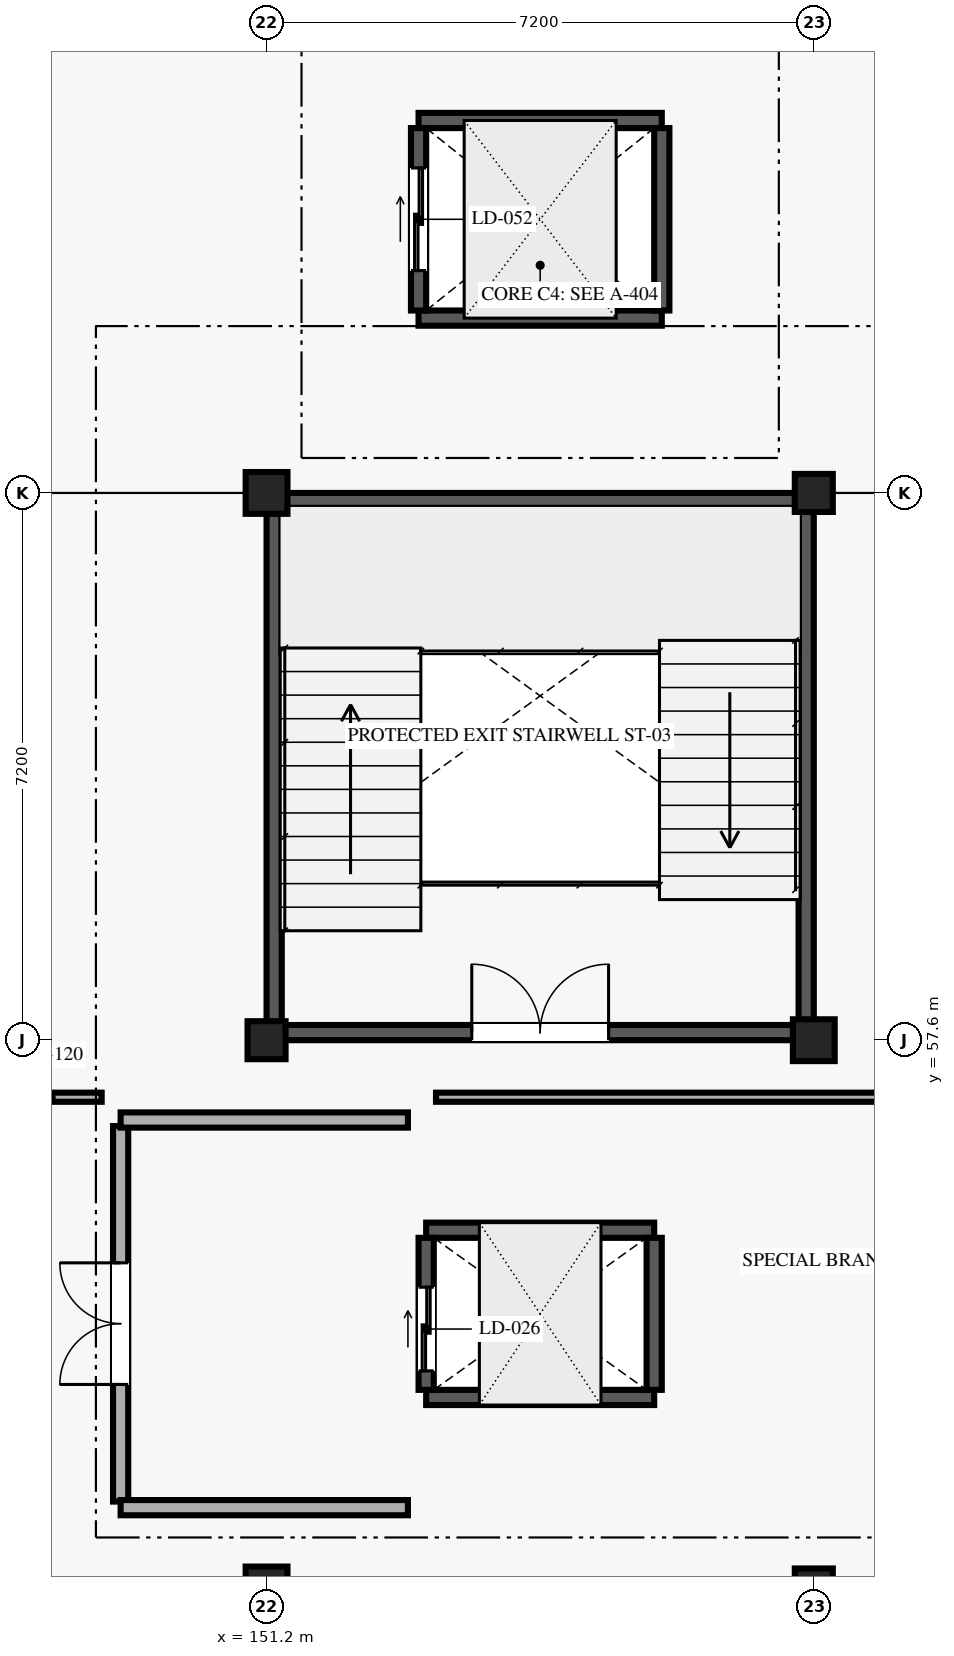
"""IFC4 building model, lengths in metres.
Left out: names, types, materials, properties, quantities, classifications, styles, units other than length and angle.
Written with IfcOpenShell. Run it as: python <this file> out.ifc"""

import sys

from ifc_helpers import new_model, si_unit, direction, frame, frame_2d, origin, origin_2d, place, context, subcontext, project, spatial, rectangle, extrude, element, fill, save


model = new_model("IFC4")
c1 = context("Model", 3, precision=1e-05, world=origin(), true_north=direction((0.0, 1.0)))
c2 = subcontext(c1, "Body", "Model", "MODEL_VIEW")
j1 = project(units=[si_unit("LENGTHUNIT", "METRE"), si_unit("PLANEANGLEUNIT", "RADIAN")], contexts=[c1])
p1 = place(None, origin())
s1 = spatial("IfcSite", under=j1, at=p1, CompositionType="ELEMENT")
p2 = place(p1, origin())
s2 = spatial("IfcBuilding", under=s1, at=p2, CompositionType="ELEMENT")
p3 = place(p2, frame((0.0, 0.0, 25.65)))
s3 = spatial("IfcBuildingStorey", under=s2, at=p3, CompositionType="ELEMENT", Elevation=25.65)
p4 = place(p3, frame((151.2, 50.4, 0.0), z_axis=(0.0, 0.0, 1.0), x_axis=(1.0, 0.0, 0.0)))
e1 = element("IfcColumn", 1, at=p4, inside=s3, PredefinedType="COLUMN", context=c2, shape_type="SweptSolid", body=[
    extrude(rectangle(XDim=0.55, YDim=0.55, at=origin_2d()), origin(), (0.0, 0.0, 1.0), 4.05),
])
p5 = place(p3, frame((151.2, 57.6, 0.0), z_axis=(0.0, 0.0, 1.0), x_axis=(1.0, 0.0, 0.0)))
e2 = element("IfcColumn", 2, at=p5, inside=s3, PredefinedType="COLUMN", context=c2, shape_type="SweptSolid", body=[
    extrude(rectangle(XDim=0.5, YDim=0.5, at=origin_2d()), origin(), (0.0, 0.0, 1.0), 4.05),
])
p6 = place(p3, frame((151.2, 64.8, 0.0), z_axis=(0.0, 0.0, 1.0), x_axis=(1.0, 0.0, 0.0)))
e3 = element("IfcColumn", 3, at=p6, inside=s3, PredefinedType="COLUMN", context=c2, shape_type="SweptSolid", body=[
    extrude(rectangle(XDim=0.55, YDim=0.55, at=origin_2d()), origin(), (0.0, 0.0, 1.0), 4.05),
])
p7 = place(p3, frame((158.4, 50.4, 0.0), z_axis=(0.0, 0.0, 1.0), x_axis=(1.0, 0.0, 0.0)))
e4 = element("IfcColumn", 4, at=p7, inside=s3, PredefinedType="COLUMN", context=c2, shape_type="SweptSolid", body=[
    extrude(rectangle(XDim=0.5, YDim=0.5, at=origin_2d()), origin(), (0.0, 0.0, 1.0), 4.05),
])
p8 = place(p3, frame((158.4, 57.6, 0.0), z_axis=(0.0, 0.0, 1.0), x_axis=(1.0, 0.0, 0.0)))
e5 = element("IfcColumn", 5, at=p8, inside=s3, PredefinedType="COLUMN", context=c2, shape_type="SweptSolid", body=[
    extrude(rectangle(XDim=0.55, YDim=0.55, at=origin_2d()), origin(), (0.0, 0.0, 1.0), 4.05),
])
p9 = place(p3, frame((158.4, 64.8, 0.0), z_axis=(0.0, 0.0, 1.0), x_axis=(1.0, 0.0, 0.0)))
e6 = element("IfcColumn", 6, at=p9, inside=s3, PredefinedType="COLUMN", context=c2, shape_type="SweptSolid", body=[
    extrude(rectangle(XDim=0.5, YDim=0.5, at=origin_2d()), origin(), (0.0, 0.0, 1.0), 4.05),
])
p10 = place(p3, frame((151.4, 57.7, 0.0), z_axis=(0.0, 0.0, 1.0), x_axis=(1.0, 0.0, 0.0)))
e7 = element("IfcWall", 7, at=p10, inside=s3, PredefinedType="SHEAR", context=c2, shape_type="SweptSolid", body=[
    extrude(rectangle(XDim=6.8, YDim=0.2, at=frame_2d((3.4, 0.0))), origin(), (0.0, 0.0, 1.0), 3.83),
])
p11 = place(p10, frame((2.5, 0.0, 0.0)))
e8 = element("IfcOpeningElement", 8, at=p11, cuts=e7, PredefinedType="OPENING", context=c2, shape_type="SweptSolid", body=[
    extrude(rectangle(XDim=1.8, YDim=2.2, at=frame_2d((0.9, 1.1))), frame((0.0, 0.11, 0.0), z_axis=(0.0, -1.0, 0.0), x_axis=(1.0, 0.0, 0.0)), (0.0, 0.0, 1.0), 0.22),
])
for number, where, z_axis, x_axis in (
    (9, (151.4, 64.7, 0.0), (0.0, 0.0, 1.0), (1.0, 0.0, 0.0)),
    (10, (151.3, 57.8, 0.0), (0.0, 0.0, 1.0), (0.0, 1.0, 0.0)),
    (11, (158.3, 57.8, 0.0), (0.0, 0.0, 1.0), (0.0, 1.0, 0.0)),
):
    element("IfcWall", number, at=place(p3, frame(where, z_axis=z_axis, x_axis=x_axis)), inside=s3, PredefinedType="SHEAR", context=c2, shape_type="SweptSolid", body=[
        extrude(rectangle(XDim=6.8, YDim=0.2, at=frame_2d((3.4, 0.0))), origin(), (0.0, 0.0, 1.0), 3.83),
    ])
for number, where, z_axis, x_axis in (
    (12, (153.3, 52.9, 0.0), (0.0, 0.0, 1.0), (1.0, 0.0, 0.0)),
    (13, (153.3, 55.1, 0.0), (0.0, 0.0, 1.0), (1.0, 0.0, 0.0)),
):
    element("IfcWall", number, at=place(p3, frame(where, z_axis=z_axis, x_axis=x_axis)), inside=s3, PredefinedType="SHEAR", context=c2, shape_type="SweptSolid", body=[
        extrude(rectangle(XDim=3.0, YDim=0.2, at=frame_2d((1.5, 0.0))), origin(), (0.0, 0.0, 1.0), 3.83),
    ])
p12 = place(p3, frame((153.3, 53.0, 0.0), z_axis=(0.0, 0.0, 1.0), x_axis=(0.0, 1.0, 0.0)))
e14 = element("IfcWall", 14, at=p12, inside=s3, PredefinedType="SHEAR", context=c2, shape_type="SweptSolid", body=[
    extrude(rectangle(XDim=2.0, YDim=0.2, at=frame_2d((1.0, 0.0))), origin(), (0.0, 0.0, 1.0), 3.83),
])
p13 = place(p12, frame((0.25, 0.0, 0.0)))
e15 = element("IfcOpeningElement", 15, at=p13, cuts=e14, PredefinedType="OPENING", context=c2, shape_type="SweptSolid", body=[
    extrude(rectangle(XDim=1.1, YDim=2.15, at=frame_2d((0.55, 1.075))), frame((0.0, 0.11, 0.0), z_axis=(0.0, -1.0, 0.0), x_axis=(1.0, 0.0, 0.0)), (0.0, 0.0, 1.0), 0.22),
])
p14 = place(p3, frame((156.3, 53.0, 0.0), z_axis=(0.0, 0.0, 1.0), x_axis=(0.0, 1.0, 0.0)))
e16 = element("IfcWall", 16, at=p14, inside=s3, PredefinedType="SHEAR", context=c2, shape_type="SweptSolid", body=[
    extrude(rectangle(XDim=2.0, YDim=0.2, at=frame_2d((1.0, 0.0))), origin(), (0.0, 0.0, 1.0), 3.83),
])
for number, where, z_axis, x_axis in (
    (17, (153.2, 67.1, 0.0), (0.0, 0.0, 1.0), (1.0, 0.0, 0.0)),
    (18, (153.2, 69.7, 0.0), (0.0, 0.0, 1.0), (1.0, 0.0, 0.0)),
):
    element("IfcWall", number, at=place(p3, frame(where, z_axis=z_axis, x_axis=x_axis)), inside=s3, PredefinedType="SHEAR", context=c2, shape_type="SweptSolid", body=[
        extrude(rectangle(XDim=3.2, YDim=0.2, at=frame_2d((1.6, 0.0))), origin(), (0.0, 0.0, 1.0), 3.83),
    ])
p15 = place(p3, frame((153.2, 67.2, 0.0), z_axis=(0.0, 0.0, 1.0), x_axis=(0.0, 1.0, 0.0)))
e19 = element("IfcWall", 19, at=p15, inside=s3, PredefinedType="SHEAR", context=c2, shape_type="SweptSolid", body=[
    extrude(rectangle(XDim=2.4, YDim=0.2, at=frame_2d((1.2, 0.0))), origin(), (0.0, 0.0, 1.0), 3.83),
])
p16 = place(p15, frame((0.525, 0.0, 0.0)))
e20 = element("IfcOpeningElement", 20, at=p16, cuts=e19, PredefinedType="OPENING", context=c2, shape_type="SweptSolid", body=[
    extrude(rectangle(XDim=1.35, YDim=2.2, at=frame_2d((0.675, 1.1))), frame((0.0, 0.11, 0.0), z_axis=(0.0, -1.0, 0.0), x_axis=(1.0, 0.0, 0.0)), (0.0, 0.0, 1.0), 0.22),
])
p17 = place(p3, frame((156.4, 67.2, 0.0), z_axis=(0.0, 0.0, 1.0), x_axis=(0.0, 1.0, 0.0)))
e21 = element("IfcWall", 21, at=p17, inside=s3, PredefinedType="SHEAR", context=c2, shape_type="SweptSolid", body=[
    extrude(rectangle(XDim=2.4, YDim=0.2, at=frame_2d((1.2, 0.0))), origin(), (0.0, 0.0, 1.0), 3.83),
])
p18 = place(p3, frame((149.28, 51.53, 0.0), z_axis=(0.0, 0.0, 1.0), x_axis=(0.0, 1.0, 0.0)))
e22 = element("IfcWall", 22, at=p18, inside=s3, PredefinedType="SOLIDWALL", context=c2, shape_type="SweptSolid", body=[
    extrude(rectangle(XDim=4.94, YDim=0.2, at=frame_2d((2.47, 0.0))), origin(), (0.0, 0.0, 1.0), 3.83),
])
p19 = place(p18, frame((1.541, 0.0, 0.0)))
e23 = element("IfcOpeningElement", 23, at=p19, cuts=e22, PredefinedType="OPENING", context=c2, shape_type="SweptSolid", body=[
    extrude(rectangle(XDim=1.6, YDim=2.2, at=frame_2d((0.8, 1.1))), frame((0.0, 0.11, 0.0), z_axis=(0.0, -1.0, 0.0), x_axis=(1.0, 0.0, 0.0)), (0.0, 0.0, 1.0), 0.22),
])
for number, where, z_axis, x_axis in (
    (24, (149.28, 51.45, 0.0), (0.0, 0.0, 1.0), (1.0, 0.0, 0.0)),
    (25, (149.28, 56.55, 0.0), (0.0, 0.0, 1.0), (1.0, 0.0, 0.0)),
):
    element("IfcWall", number, at=place(p3, frame(where, z_axis=z_axis, x_axis=x_axis)), inside=s3, PredefinedType="SOLIDWALL", context=c2, shape_type="SweptSolid", body=[
        extrude(rectangle(XDim=3.78, YDim=0.2, at=frame_2d((1.89, 0.0))), origin(), (0.0, 0.0, 1.0), 3.83),
    ])
p20 = place(p3, frame((153.429, 56.85, 0.0), z_axis=(0.0, 0.0, 1.0), x_axis=(1.0, 0.0, 0.0)))
e26 = element("IfcWall", 26, at=p20, inside=s3, PredefinedType="PARTITIONING", context=c2, shape_type="SweptSolid", body=[
    extrude(rectangle(XDim=11.371, YDim=0.12, at=frame_2d((5.685, 0.0))), origin(), (0.0, 0.0, 1.0), 3.83),
])
p21 = place(p3, frame((147.7, 56.85, 0.0), z_axis=(0.0, 0.0, 1.0), x_axis=(1.0, 0.0, 0.0)))
e27 = element("IfcWall", 27, at=p21, inside=s3, PredefinedType="PARTITIONING", context=c2, shape_type="SweptSolid", body=[
    extrude(rectangle(XDim=1.331, YDim=0.12, at=frame_2d((0.665, 0.0))), origin(), (0.0, 0.0, 1.0), 3.83),
])
p22 = place(p11, origin())
e28 = element("IfcDoor", 28, at=p22, inside=s3, OperationType="DOUBLE_DOOR_SINGLE_SWING", PredefinedType="DOOR", context=c2, shape_type="SweptSolid", body=[
    extrude(rectangle(XDim=1.8, YDim=2.2, at=frame_2d((0.9, 1.1))), frame((0.0, 0.025, 0.0), z_axis=(0.0, -1.0, 0.0), x_axis=(1.0, 0.0, 0.0)), (0.0, 0.0, 1.0), 0.05),
])
fill(e8, e28)
p23 = place(p13, origin())
e29 = element("IfcDoor", 29, at=p23, inside=s3, OperationType="DOUBLE_DOOR_SLIDING", PredefinedType="DOOR", context=c2, shape_type="SweptSolid", body=[
    extrude(rectangle(XDim=1.1, YDim=2.15, at=frame_2d((0.55, 1.075))), frame((0.0, 0.025, 0.0), z_axis=(0.0, -1.0, 0.0), x_axis=(1.0, 0.0, 0.0)), (0.0, 0.0, 1.0), 0.05),
])
fill(e15, e29)
p24 = place(p16, origin())
e30 = element("IfcDoor", 30, at=p24, inside=s3, OperationType="DOUBLE_DOOR_SLIDING", PredefinedType="DOOR", context=c2, shape_type="SweptSolid", body=[
    extrude(rectangle(XDim=1.35, YDim=2.2, at=frame_2d((0.675, 1.1))), frame((0.0, 0.025, 0.0), z_axis=(0.0, -1.0, 0.0), x_axis=(1.0, 0.0, 0.0)), (0.0, 0.0, 1.0), 0.05),
])
fill(e20, e30)
p25 = place(p19, origin())
e31 = element("IfcDoor", 31, at=p25, inside=s3, OperationType="DOUBLE_DOOR_SINGLE_SWING", PredefinedType="DOOR", context=c2, shape_type="SweptSolid", body=[
    extrude(rectangle(XDim=1.6, YDim=2.2, at=frame_2d((0.8, 1.1))), frame((0.0, 0.025, 0.0), z_axis=(0.0, -1.0, 0.0), x_axis=(1.0, 0.0, 0.0)), (0.0, 0.0, 1.0), 0.05),
])
fill(e23, e31)
save(model, sys.argv[1])
